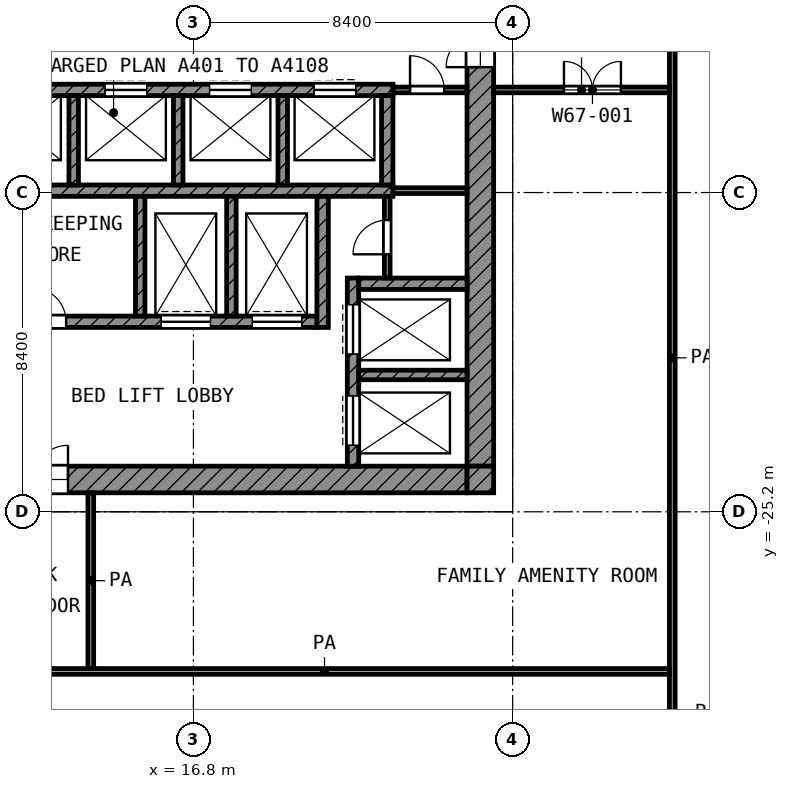
"""IFC4 building model, lengths in metres.
Left out: names, types, materials, properties, quantities, classifications, styles, units other than length and angle.
Written with IfcOpenShell. Run it as: python <this file> out.ifc"""

import sys

from ifc_helpers import new_model, si_unit, direction, frame, frame_2d, origin, place, context, subcontext, project, spatial, rectangle, extrude, element, fill, save


model = new_model("IFC4")
c1 = context("Model", 3, precision=1e-05, world=origin(), true_north=direction((0.0, 1.0)))
c2 = subcontext(c1, "Body", "Model", "MODEL_VIEW")
j1 = project(units=[si_unit("LENGTHUNIT", "METRE"), si_unit("PLANEANGLEUNIT", "RADIAN")], contexts=[c1])
p1 = place(None, origin())
s1 = spatial("IfcSite", under=j1, at=p1, CompositionType="ELEMENT")
p2 = place(p1, origin())
s2 = spatial("IfcBuilding", under=s1, at=p2, CompositionType="ELEMENT")
p3 = place(p2, frame((0.0, 0.0, 311.2)))
s3 = spatial("IfcBuildingStorey", under=s2, at=p3, CompositionType="ELEMENT", Elevation=311.2)
p4 = place(p3, frame((24.35, -24.0, 0.0), z_axis=(0.0, 0.0, 1.0), x_axis=(0.0, 1.0, 0.0)))
e1 = element("IfcWall", 1, at=p4, inside=s3, PredefinedType="SHEAR", context=c2, shape_type="SweptSolid", body=[
    extrude(rectangle(XDim=18.6, YDim=0.7, at=frame_2d((9.3, 0.0))), origin(), (0.0, 0.0, 1.0), 3.6),
])
p5 = place(p4, frame((10.5, 0.0, 0.0)))
e2 = element("IfcOpeningElement", 2, at=p5, cuts=e1, PredefinedType="OPENING", context=c2, shape_type="SweptSolid", body=[
    extrude(rectangle(XDim=1.8, YDim=2.1, at=frame_2d((0.9, 1.05))), frame((0.0, 0.36, 0.0), z_axis=(0.0, -1.0, 0.0), x_axis=(1.0, 0.0, 0.0)), (0.0, 0.0, 1.0), 0.72),
])
p6 = place(p3, frame((5.4, -24.35, 0.0), z_axis=(0.0, 0.0, 1.0), x_axis=(1.0, 0.0, 0.0)))
e3 = element("IfcWall", 3, at=p6, inside=s3, PredefinedType="SHEAR", context=c2, shape_type="SweptSolid", body=[
    extrude(rectangle(XDim=18.6, YDim=0.7, at=frame_2d((9.3, 0.0))), origin(), (0.0, 0.0, 1.0), 3.6),
])
p7 = place(p6, frame((6.3, 0.0, 0.0)))
e4 = element("IfcOpeningElement", 4, at=p7, cuts=e3, PredefinedType="OPENING", context=c2, shape_type="SweptSolid", body=[
    extrude(rectangle(XDim=1.8, YDim=2.1, at=frame_2d((0.9, 1.05))), frame((0.0, 0.36, 0.0), z_axis=(0.0, -1.0, 0.0), x_axis=(1.0, 0.0, 0.0)), (0.0, 0.0, 1.0), 0.72),
])
p8 = place(p3, frame((24.35, -24.7, 0.0), z_axis=(0.0, 0.0, 1.0), x_axis=(0.0, 1.0, 0.0)))
e5 = element("IfcWall", 5, at=p8, inside=s3, PredefinedType="SHEAR", context=c2, shape_type="SweptSolid", body=[
    extrude(rectangle(XDim=0.7, YDim=0.7, at=frame_2d((0.35, 0.0))), origin(), (0.0, 0.0, 1.0), 3.6),
])
p9 = place(p3, frame((5.4, -14.1, 0.0), z_axis=(0.0, 0.0, 1.0), x_axis=(1.0, 0.0, 0.0)))
e6 = element("IfcWall", 6, at=p9, inside=s3, PredefinedType="SHEAR", context=c2, shape_type="SweptSolid", body=[
    extrude(rectangle(XDim=16.65, YDim=0.3, at=frame_2d((8.325, 0.0))), origin(), (0.0, 0.0, 1.0), 3.6),
])
p10 = place(p9, frame((6.325, 0.0, 0.0)))
e7 = element("IfcOpeningElement", 7, at=p10, cuts=e6, PredefinedType="OPENING", context=c2, shape_type="SweptSolid", body=[
    extrude(rectangle(XDim=1.1, YDim=2.1, at=frame_2d((0.55, 1.05))), frame((0.0, 0.16, 0.0), z_axis=(0.0, -1.0, 0.0), x_axis=(1.0, 0.0, 0.0)), (0.0, 0.0, 1.0), 0.32),
])
p11 = place(p9, frame((9.075, 0.0, 0.0)))
e8 = element("IfcOpeningElement", 8, at=p11, cuts=e6, PredefinedType="OPENING", context=c2, shape_type="SweptSolid", body=[
    extrude(rectangle(XDim=1.1, YDim=2.1, at=frame_2d((0.55, 1.05))), frame((0.0, 0.16, 0.0), z_axis=(0.0, -1.0, 0.0), x_axis=(1.0, 0.0, 0.0)), (0.0, 0.0, 1.0), 0.32),
])
p12 = place(p9, frame((11.825, 0.0, 0.0)))
e9 = element("IfcOpeningElement", 9, at=p12, cuts=e6, PredefinedType="OPENING", context=c2, shape_type="SweptSolid", body=[
    extrude(rectangle(XDim=1.1, YDim=2.1, at=frame_2d((0.55, 1.05))), frame((0.0, 0.16, 0.0), z_axis=(0.0, -1.0, 0.0), x_axis=(1.0, 0.0, 0.0)), (0.0, 0.0, 1.0), 0.32),
])
p13 = place(p9, frame((14.575, 0.0, 0.0)))
e10 = element("IfcOpeningElement", 10, at=p13, cuts=e6, PredefinedType="OPENING", context=c2, shape_type="SweptSolid", body=[
    extrude(rectangle(XDim=1.1, YDim=2.1, at=frame_2d((0.55, 1.05))), frame((0.0, 0.16, 0.0), z_axis=(0.0, -1.0, 0.0), x_axis=(1.0, 0.0, 0.0)), (0.0, 0.0, 1.0), 0.32),
])
p14 = place(p9, frame((2.3, 0.0, 0.0)))
e11 = element("IfcOpeningElement", 11, at=p14, cuts=e6, PredefinedType="OPENING", context=c2, shape_type="SweptSolid", body=[
    extrude(rectangle(XDim=0.9, YDim=2.1, at=frame_2d((0.45, 1.05))), frame((0.0, 0.16, 0.0), z_axis=(0.0, -1.0, 0.0), x_axis=(1.0, 0.0, 0.0)), (0.0, 0.0, 1.0), 0.32),
])
p15 = place(p3, frame((5.4, -16.75, 0.0), z_axis=(0.0, 0.0, 1.0), x_axis=(1.0, 0.0, 0.0)))
e12 = element("IfcWall", 12, at=p15, inside=s3, PredefinedType="SHEAR", context=c2, shape_type="SweptSolid", body=[
    extrude(rectangle(XDim=16.65, YDim=0.3, at=frame_2d((8.325, 0.0))), origin(), (0.0, 0.0, 1.0), 3.6),
])
p16 = place(p3, frame((5.4, -20.2, 0.0), z_axis=(0.0, 0.0, 1.0), x_axis=(1.0, 0.0, 0.0)))
e13 = element("IfcWall", 13, at=p16, inside=s3, PredefinedType="SHEAR", context=c2, shape_type="SweptSolid", body=[
    extrude(rectangle(XDim=14.65, YDim=0.3, at=frame_2d((7.325, 0.0))), origin(), (0.0, 0.0, 1.0), 3.6),
])
p17 = place(p16, frame((10.55, 0.0, 0.0)))
e14 = element("IfcOpeningElement", 14, at=p17, cuts=e13, PredefinedType="OPENING", context=c2, shape_type="SweptSolid", body=[
    extrude(rectangle(XDim=1.3, YDim=2.1, at=frame_2d((0.65, 1.05))), frame((0.0, 0.16, 0.0), z_axis=(0.0, -1.0, 0.0), x_axis=(1.0, 0.0, 0.0)), (0.0, 0.0, 1.0), 0.32),
])
p18 = place(p16, frame((12.95, 0.0, 0.0)))
e15 = element("IfcOpeningElement", 15, at=p18, cuts=e13, PredefinedType="OPENING", context=c2, shape_type="SweptSolid", body=[
    extrude(rectangle(XDim=1.3, YDim=2.1, at=frame_2d((0.65, 1.05))), frame((0.0, 0.16, 0.0), z_axis=(0.0, -1.0, 0.0), x_axis=(1.0, 0.0, 0.0)), (0.0, 0.0, 1.0), 0.32),
])
p19 = place(p16, frame((0.55, 0.0, 0.0)))
e16 = element("IfcOpeningElement", 16, at=p19, cuts=e13, PredefinedType="OPENING", context=c2, shape_type="SweptSolid", body=[
    extrude(rectangle(XDim=1.3, YDim=2.1, at=frame_2d((0.65, 1.05))), frame((0.0, 0.16, 0.0), z_axis=(0.0, -1.0, 0.0), x_axis=(1.0, 0.0, 0.0)), (0.0, 0.0, 1.0), 0.32),
])
p20 = place(p16, frame((2.95, 0.0, 0.0)))
e17 = element("IfcOpeningElement", 17, at=p20, cuts=e13, PredefinedType="OPENING", context=c2, shape_type="SweptSolid", body=[
    extrude(rectangle(XDim=1.3, YDim=2.1, at=frame_2d((0.65, 1.05))), frame((0.0, 0.16, 0.0), z_axis=(0.0, -1.0, 0.0), x_axis=(1.0, 0.0, 0.0)), (0.0, 0.0, 1.0), 0.32),
])
p21 = place(p16, frame((7.15, 0.0, 0.0)))
e18 = element("IfcOpeningElement", 18, at=p21, cuts=e13, PredefinedType="OPENING", context=c2, shape_type="SweptSolid", body=[
    extrude(rectangle(XDim=0.9, YDim=2.1, at=frame_2d((0.45, 1.05))), frame((0.0, 0.16, 0.0), z_axis=(0.0, -1.0, 0.0), x_axis=(1.0, 0.0, 0.0)), (0.0, 0.0, 1.0), 0.32),
])
p22 = place(p3, frame((20.2, -20.35, 0.0), z_axis=(0.0, 0.0, 1.0), x_axis=(0.0, 1.0, 0.0)))
e19 = element("IfcWall", 19, at=p22, inside=s3, PredefinedType="SHEAR", context=c2, shape_type="SweptSolid", body=[
    extrude(rectangle(XDim=3.45, YDim=0.3, at=frame_2d((1.725, 0.0))), origin(), (0.0, 0.0, 1.0), 3.6),
])
p23 = place(p3, frame((21.9, -16.6, 0.0), z_axis=(0.0, 0.0, 1.0), x_axis=(0.0, 1.0, 0.0)))
e20 = element("IfcWall", 20, at=p23, inside=s3, PredefinedType="SHEAR", context=c2, shape_type="SweptSolid", body=[
    extrude(rectangle(XDim=2.35, YDim=0.3, at=frame_2d((1.175, 0.0))), origin(), (0.0, 0.0, 1.0), 3.6),
])
p24 = place(p3, frame((21.15, -19.2, 0.0), z_axis=(0.0, 0.0, 1.0), x_axis=(1.0, 0.0, 0.0)))
e21 = element("IfcWall", 21, at=p24, inside=s3, PredefinedType="SHEAR", context=c2, shape_type="SweptSolid", body=[
    extrude(rectangle(XDim=2.85, YDim=0.3, at=frame_2d((1.425, 0.0))), origin(), (0.0, 0.0, 1.0), 3.6),
])
p25 = place(p3, frame((21.0, -24.0, 0.0), z_axis=(0.0, 0.0, 1.0), x_axis=(0.0, 1.0, 0.0)))
e22 = element("IfcWall", 22, at=p25, inside=s3, PredefinedType="SHEAR", context=c2, shape_type="SweptSolid", body=[
    extrude(rectangle(XDim=4.95, YDim=0.3, at=frame_2d((2.475, 0.0))), origin(), (0.0, 0.0, 1.0), 3.6),
])
p26 = place(p25, frame((2.95, 0.0, 0.0)))
e23 = element("IfcOpeningElement", 23, at=p26, cuts=e22, PredefinedType="OPENING", context=c2, shape_type="SweptSolid", body=[
    extrude(rectangle(XDim=1.3, YDim=2.1, at=frame_2d((0.65, 1.05))), frame((0.0, 0.16, 0.0), z_axis=(0.0, -1.0, 0.0), x_axis=(1.0, 0.0, 0.0)), (0.0, 0.0, 1.0), 0.32),
])
p27 = place(p25, frame((0.55, 0.0, 0.0)))
e24 = element("IfcOpeningElement", 24, at=p27, cuts=e22, PredefinedType="OPENING", context=c2, shape_type="SweptSolid", body=[
    extrude(rectangle(XDim=1.3, YDim=2.1, at=frame_2d((0.65, 1.05))), frame((0.0, 0.16, 0.0), z_axis=(0.0, -1.0, 0.0), x_axis=(1.0, 0.0, 0.0)), (0.0, 0.0, 1.0), 0.32),
])
p28 = place(p3, frame((21.15, -21.6, 0.0), z_axis=(0.0, 0.0, 1.0), x_axis=(1.0, 0.0, 0.0)))
e25 = element("IfcWall", 25, at=p28, inside=s3, PredefinedType="SHEAR", context=c2, shape_type="SweptSolid", body=[
    extrude(rectangle(XDim=2.85, YDim=0.25, at=frame_2d((1.425, 0.0))), origin(), (0.0, 0.0, 1.0), 3.6),
])
for number, where, z_axis, x_axis in (
    (26, (15.4, -20.05, 0.0), (0.0, 0.0, 1.0), (0.0, 1.0, 0.0)),
    (27, (17.8, -20.05, 0.0), (0.0, 0.0, 1.0), (0.0, 1.0, 0.0)),
):
    element("IfcWall", number, at=place(p3, frame(where, z_axis=z_axis, x_axis=x_axis)), inside=s3, PredefinedType="SHEAR", context=c2, shape_type="SweptSolid", body=[
        extrude(rectangle(XDim=3.15, YDim=0.25, at=frame_2d((1.575, 0.0))), origin(), (0.0, 0.0, 1.0), 3.6),
    ])
for number, where, z_axis, x_axis in (
    (28, (13.65, -16.6, 0.0), (0.0, 0.0, 1.0), (0.0, 1.0, 0.0)),
    (29, (16.4, -16.6, 0.0), (0.0, 0.0, 1.0), (0.0, 1.0, 0.0)),
    (30, (19.15, -16.6, 0.0), (0.0, 0.0, 1.0), (0.0, 1.0, 0.0)),
):
    element("IfcWall", number, at=place(p3, frame(where, z_axis=z_axis, x_axis=x_axis)), inside=s3, PredefinedType="SHEAR", context=c2, shape_type="SweptSolid", body=[
        extrude(rectangle(XDim=2.35, YDim=0.25, at=frame_2d((1.175, 0.0))), origin(), (0.0, 0.0, 1.0), 3.6),
    ])
p29 = place(p3, frame((21.9, -19.05, 0.0), z_axis=(0.0, 0.0, 1.0), x_axis=(0.0, 1.0, 0.0)))
e31 = element("IfcWall", 31, at=p29, inside=s3, PredefinedType="PARTITIONING", context=c2, shape_type="SweptSolid", body=[
    extrude(rectangle(XDim=2.15, YDim=0.15, at=frame_2d((1.075, 0.0))), origin(), (0.0, 0.0, 1.0), 3.6),
])
p30 = place(p29, frame((0.625, 0.0, 0.0)))
e32 = element("IfcOpeningElement", 32, at=p30, cuts=e31, PredefinedType="OPENING", context=c2, shape_type="SweptSolid", body=[
    extrude(rectangle(XDim=0.9, YDim=2.1, at=frame_2d((0.45, 1.05))), frame((0.0, 0.085, 0.0), z_axis=(0.0, -1.0, 0.0), x_axis=(1.0, 0.0, 0.0)), (0.0, 0.0, 1.0), 0.17),
])
p31 = place(p3, frame((22.05, -16.75, 0.0), z_axis=(0.0, 0.0, 1.0), x_axis=(1.0, 0.0, 0.0)))
e33 = element("IfcWall", 33, at=p31, inside=s3, PredefinedType="PARTITIONING", context=c2, shape_type="SweptSolid", body=[
    extrude(rectangle(XDim=1.95, YDim=0.15, at=frame_2d((0.975, 0.0))), origin(), (0.0, 0.0, 1.0), 3.6),
])
p32 = place(p3, frame((22.05, -14.1, 0.0), z_axis=(0.0, 0.0, 1.0), x_axis=(1.0, 0.0, 0.0)))
e34 = element("IfcWall", 34, at=p32, inside=s3, PredefinedType="PARTITIONING", context=c2, shape_type="SweptSolid", body=[
    extrude(rectangle(XDim=1.95, YDim=0.15, at=frame_2d((0.975, 0.0))), origin(), (0.0, 0.0, 1.0), 3.6),
])
p33 = place(p32, frame((0.45, 0.0, 0.0)))
e35 = element("IfcOpeningElement", 35, at=p33, cuts=e34, PredefinedType="OPENING", context=c2, shape_type="SweptSolid", body=[
    extrude(rectangle(XDim=0.9, YDim=2.1, at=frame_2d((0.45, 1.05))), frame((0.0, 0.085, 0.0), z_axis=(0.0, -1.0, 0.0), x_axis=(1.0, 0.0, 0.0)), (0.0, 0.0, 1.0), 0.17),
])
p34 = place(p3, frame((11.175, -29.4, 0.0), z_axis=(0.0, 0.0, 1.0), x_axis=(1.0, 0.0, 0.0)))
e36 = element("IfcWall", 36, at=p34, inside=s3, PredefinedType="PARTITIONING", context=c2, shape_type="SweptSolid", body=[
    extrude(rectangle(XDim=18.15, YDim=0.15, at=frame_2d((9.075, 0.0))), origin(), (0.0, 0.0, 1.0), 3.6),
])
p35 = place(p3, frame((24.7, -14.1, 0.0), z_axis=(0.0, 0.0, 1.0), x_axis=(1.0, 0.0, 0.0)))
e37 = element("IfcWall", 37, at=p35, inside=s3, PredefinedType="PARTITIONING", context=c2, shape_type="SweptSolid", body=[
    extrude(rectangle(XDim=4.625, YDim=0.15, at=frame_2d((2.312, 0.0))), origin(), (0.0, 0.0, 1.0), 3.6),
])
p36 = place(p35, frame((1.85, 0.0, 0.0)))
e38 = element("IfcOpeningElement", 38, at=p36, cuts=e37, PredefinedType="OPENING", context=c2, shape_type="SweptSolid", body=[
    extrude(rectangle(XDim=1.5, YDim=2.1, at=frame_2d((0.75, 1.05))), frame((0.0, 0.085, 0.0), z_axis=(0.0, -1.0, 0.0), x_axis=(1.0, 0.0, 0.0)), (0.0, 0.0, 1.0), 0.17),
])
p37 = place(p3, frame((14.1, -29.325, 0.0), z_axis=(0.0, 0.0, 1.0), x_axis=(0.0, 1.0, 0.0)))
e39 = element("IfcWall", 39, at=p37, inside=s3, PredefinedType="PARTITIONING", context=c2, shape_type="SweptSolid", body=[
    extrude(rectangle(XDim=4.625, YDim=0.15, at=frame_2d((2.312, 0.0))), origin(), (0.0, 0.0, 1.0), 3.6),
])
p38 = place(p3, frame((29.4, -31.198, 0.0), z_axis=(0.0, 0.0, 1.0), x_axis=(0.0, 1.0, 0.0)))
e40 = element("IfcWall", 40, at=p38, inside=s3, PredefinedType="PARTITIONING", context=c2, shape_type="SweptSolid", body=[
    extrude(rectangle(XDim=20.098, YDim=0.15, at=frame_2d((10.049, 0.0))), origin(), (0.0, 0.0, 1.0), 3.6),
])
p39 = place(p11, origin())
e41 = element("IfcDoor", 41, at=p39, inside=s3, OperationType="DOUBLE_DOOR_SLIDING", PredefinedType="DOOR", context=c2, shape_type="SweptSolid", body=[
    extrude(rectangle(XDim=1.1, YDim=2.1, at=frame_2d((0.55, 1.05))), frame((0.0, 0.025, 0.0), z_axis=(0.0, -1.0, 0.0), x_axis=(1.0, 0.0, 0.0)), (0.0, 0.0, 1.0), 0.05),
])
fill(e8, e41)
p40 = place(p12, origin())
e42 = element("IfcDoor", 42, at=p40, inside=s3, OperationType="DOUBLE_DOOR_SLIDING", PredefinedType="DOOR", context=c2, shape_type="SweptSolid", body=[
    extrude(rectangle(XDim=1.1, YDim=2.1, at=frame_2d((0.55, 1.05))), frame((0.0, 0.025, 0.0), z_axis=(0.0, -1.0, 0.0), x_axis=(1.0, 0.0, 0.0)), (0.0, 0.0, 1.0), 0.05),
])
fill(e9, e42)
p41 = place(p13, origin())
e43 = element("IfcDoor", 43, at=p41, inside=s3, OperationType="DOUBLE_DOOR_SLIDING", PredefinedType="DOOR", context=c2, shape_type="SweptSolid", body=[
    extrude(rectangle(XDim=1.1, YDim=2.1, at=frame_2d((0.55, 1.05))), frame((0.0, 0.025, 0.0), z_axis=(0.0, -1.0, 0.0), x_axis=(1.0, 0.0, 0.0)), (0.0, 0.0, 1.0), 0.05),
])
fill(e10, e43)
p42 = place(p26, origin())
e44 = element("IfcDoor", 44, at=p42, inside=s3, OperationType="DOUBLE_DOOR_SLIDING", PredefinedType="DOOR", context=c2, shape_type="SweptSolid", body=[
    extrude(rectangle(XDim=1.3, YDim=2.1, at=frame_2d((0.65, 1.05))), frame((0.0, 0.025, 0.0), z_axis=(0.0, -1.0, 0.0), x_axis=(1.0, 0.0, 0.0)), (0.0, 0.0, 1.0), 0.05),
])
fill(e23, e44)
p43 = place(p27, origin())
e45 = element("IfcDoor", 45, at=p43, inside=s3, OperationType="DOUBLE_DOOR_SLIDING", PredefinedType="DOOR", context=c2, shape_type="SweptSolid", body=[
    extrude(rectangle(XDim=1.3, YDim=2.1, at=frame_2d((0.65, 1.05))), frame((0.0, 0.025, 0.0), z_axis=(0.0, -1.0, 0.0), x_axis=(1.0, 0.0, 0.0)), (0.0, 0.0, 1.0), 0.05),
])
fill(e24, e45)
p44 = place(p17, origin())
e46 = element("IfcDoor", 46, at=p44, inside=s3, OperationType="DOUBLE_DOOR_SLIDING", PredefinedType="DOOR", context=c2, shape_type="SweptSolid", body=[
    extrude(rectangle(XDim=1.3, YDim=2.1, at=frame_2d((0.65, 1.05))), frame((0.0, 0.025, 0.0), z_axis=(0.0, -1.0, 0.0), x_axis=(1.0, 0.0, 0.0)), (0.0, 0.0, 1.0), 0.05),
])
fill(e14, e46)
p45 = place(p18, origin())
e47 = element("IfcDoor", 47, at=p45, inside=s3, OperationType="DOUBLE_DOOR_SLIDING", PredefinedType="DOOR", context=c2, shape_type="SweptSolid", body=[
    extrude(rectangle(XDim=1.3, YDim=2.1, at=frame_2d((0.65, 1.05))), frame((0.0, 0.025, 0.0), z_axis=(0.0, -1.0, 0.0), x_axis=(1.0, 0.0, 0.0)), (0.0, 0.0, 1.0), 0.05),
])
fill(e15, e47)
p46 = place(p5, origin())
e48 = element("IfcDoor", 48, at=p46, inside=s3, OperationType="DOUBLE_DOOR_SINGLE_SWING", PredefinedType="DOOR", context=c2, shape_type="SweptSolid", body=[
    extrude(rectangle(XDim=1.8, YDim=2.1, at=frame_2d((0.9, 1.05))), frame((0.0, 0.025, 0.0), z_axis=(0.0, -1.0, 0.0), x_axis=(1.0, 0.0, 0.0)), (0.0, 0.0, 1.0), 0.05),
])
fill(e2, e48)
p47 = place(p7, origin())
e49 = element("IfcDoor", 49, at=p47, inside=s3, OperationType="DOUBLE_DOOR_SINGLE_SWING", PredefinedType="DOOR", context=c2, shape_type="SweptSolid", body=[
    extrude(rectangle(XDim=1.8, YDim=2.1, at=frame_2d((0.9, 1.05))), frame((0.0, 0.025, 0.0), z_axis=(0.0, -1.0, 0.0), x_axis=(1.0, 0.0, 0.0)), (0.0, 0.0, 1.0), 0.05),
])
fill(e4, e49)
p48 = place(p33, origin())
e50 = element("IfcDoor", 50, at=p48, inside=s3, OperationType="SINGLE_SWING_LEFT", PredefinedType="DOOR", context=c2, shape_type="SweptSolid", body=[
    extrude(rectangle(XDim=0.9, YDim=2.1, at=frame_2d((0.45, 1.05))), frame((0.0, 0.025, 0.0), z_axis=(0.0, -1.0, 0.0), x_axis=(1.0, 0.0, 0.0)), (0.0, 0.0, 1.0), 0.05),
])
fill(e35, e50)
p49 = place(p30, origin())
e51 = element("IfcDoor", 51, at=p49, inside=s3, OperationType="SINGLE_SWING_LEFT", PredefinedType="DOOR", context=c2, shape_type="SweptSolid", body=[
    extrude(rectangle(XDim=0.9, YDim=2.1, at=frame_2d((0.45, 1.05))), frame((0.0, 0.025, 0.0), z_axis=(0.0, -1.0, 0.0), x_axis=(1.0, 0.0, 0.0)), (0.0, 0.0, 1.0), 0.05),
])
fill(e32, e51)
p50 = place(p21, origin())
e52 = element("IfcDoor", 52, at=p50, inside=s3, OperationType="SINGLE_SWING_LEFT", PredefinedType="DOOR", context=c2, shape_type="SweptSolid", body=[
    extrude(rectangle(XDim=0.9, YDim=2.1, at=frame_2d((0.45, 1.05))), frame((0.0, 0.025, 0.0), z_axis=(0.0, -1.0, 0.0), x_axis=(1.0, 0.0, 0.0)), (0.0, 0.0, 1.0), 0.05),
])
fill(e18, e52)
p51 = place(p36, origin())
e53 = element("IfcDoor", 53, at=p51, inside=s3, OperationType="DOUBLE_DOOR_SINGLE_SWING", PredefinedType="DOOR", context=c2, shape_type="SweptSolid", body=[
    extrude(rectangle(XDim=1.5, YDim=2.1, at=frame_2d((0.75, 1.05))), frame((0.0, 0.025, 0.0), z_axis=(0.0, -1.0, 0.0), x_axis=(1.0, 0.0, 0.0)), (0.0, 0.0, 1.0), 0.05),
])
fill(e38, e53)
save(model, sys.argv[1])
